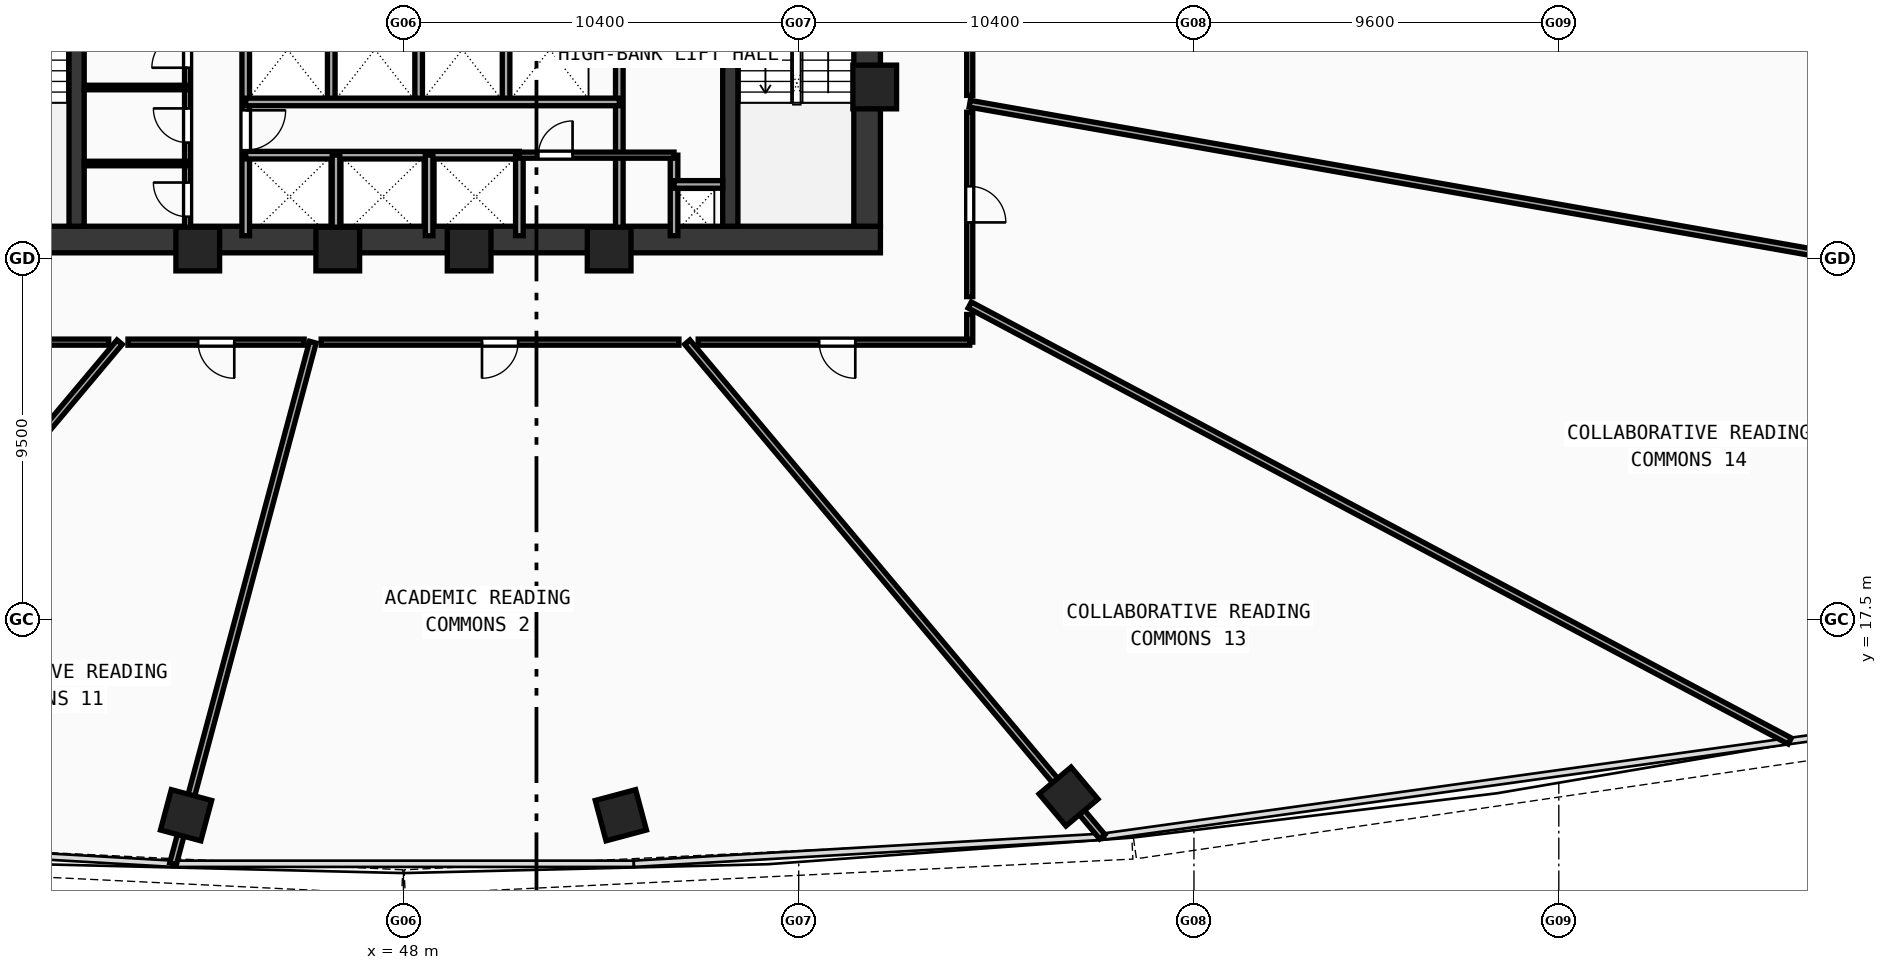
"""IFC4 building model, lengths in metres.
Left out: names, types, materials, properties, quantities, classifications, styles, units other than length and angle.
Written with IfcOpenShell. Run it as: python <this file> out.ifc"""

import sys

from ifc_helpers import new_model, si_unit, direction, frame, frame_2d, origin, origin_with_axes, origin_2d, place, context, subcontext, project, spatial, rectangle, hollow_rectangle, extrude, source, transform, mapped, element, fill, save


model = new_model("IFC4")
c1 = context("Model", 3, precision=1e-05, world=origin(), true_north=direction((0.0, 1.0)))
c2 = subcontext(c1, "Body", "Model", "MODEL_VIEW")
j1 = project(units=[si_unit("LENGTHUNIT", "METRE"), si_unit("PLANEANGLEUNIT", "RADIAN")], contexts=[c1])
p1 = place(None, origin())
s1 = spatial("IfcSite", under=j1, at=p1, CompositionType="ELEMENT")
p2 = place(p1, origin())
s2 = spatial("IfcBuilding", under=s1, at=p2, CompositionType="ELEMENT")
p3 = place(p2, frame((0.0, 0.0, 55.81)))
s3 = spatial("IfcBuildingStorey", under=s2, at=p3, CompositionType="ELEMENT", Elevation=55.81)
p4 = place(p3, frame((35.45, 27.5, 0.0), z_axis=(0.0, 0.0, 1.0), x_axis=(1.0, 0.0, 0.0)))
e1 = element("IfcWall", 1, at=p4, inside=s3, PredefinedType="SHEAR", context=c2, shape_type="SweptSolid", body=[
    extrude(rectangle(XDim=25.1, YDim=0.7, at=frame_2d((12.55, 0.0))), origin(), (0.0, 0.0, 1.0), 3.37),
])
p5 = place(p3, frame((60.2, 27.85, 0.0), z_axis=(0.0, 0.0, 1.0), x_axis=(0.0, 1.0, 0.0)))
e2 = element("IfcWall", 2, at=p5, inside=s3, PredefinedType="SHEAR", context=c2, shape_type="SweptSolid", body=[
    extrude(rectangle(XDim=12.0, YDim=0.7, at=frame_2d((6.0, 0.0))), origin(), (0.0, 0.0, 1.0), 3.37),
])
p6 = place(p3, frame((39.4, 27.85, 0.0), z_axis=(0.0, 0.0, 1.0), x_axis=(0.0, 1.0, 0.0)))
e3 = element("IfcWall", 3, at=p6, inside=s3, PredefinedType="SHEAR", context=c2, shape_type="SweptSolid", body=[
    extrude(rectangle(XDim=12.0, YDim=0.4, at=frame_2d((6.0, 0.0))), origin(), (0.0, 0.0, 1.0), 3.37),
])
p7 = place(p6, frame((9.9, 0.0, 0.0)))
e4 = element("IfcOpeningElement", 4, at=p7, cuts=e3, PredefinedType="OPENING", context=c2, shape_type="SweptSolid", body=[
    extrude(rectangle(XDim=1.1, YDim=2.1, at=frame_2d((0.55, 1.05))), frame((0.0, 0.21, 0.0), z_axis=(0.0, -1.0, 0.0), x_axis=(1.0, 0.0, 0.0)), (0.0, 0.0, 1.0), 0.42),
])
p8 = place(p3, frame((56.6, 27.85, 0.0), z_axis=(0.0, 0.0, 1.0), x_axis=(0.0, 1.0, 0.0)))
e5 = element("IfcWall", 5, at=p8, inside=s3, PredefinedType="SHEAR", context=c2, shape_type="SweptSolid", body=[
    extrude(rectangle(XDim=12.0, YDim=0.4, at=frame_2d((6.0, 0.0))), origin(), (0.0, 0.0, 1.0), 3.37),
])
p9 = place(p8, frame((9.9, 0.0, 0.0)))
e6 = element("IfcOpeningElement", 6, at=p9, cuts=e5, PredefinedType="OPENING", context=c2, shape_type="SweptSolid", body=[
    extrude(rectangle(XDim=1.1, YDim=2.1, at=frame_2d((0.55, 1.05))), frame((0.0, 0.21, 0.0), z_axis=(0.0, -1.0, 0.0), x_axis=(1.0, 0.0, 0.0)), (0.0, 0.0, 1.0), 0.42),
])
m1 = source(origin(), c2, "Body", "SweptSolid", [
    extrude(hollow_rectangle(XDim=1.15, YDim=1.15, WallThickness=0.048, at=origin_2d()), origin(), (0.0, 0.0, 1.0), 3.63),
])
for number, where, z_axis, x_axis in (
    (7, (42.588, 27.25, -0.26), (0.0, 0.0, 1.0), (1.0, 0.0, 0.0)),
    (8, (46.272, 27.25, -0.26), (0.0, 0.0, 1.0), (1.0, 0.0, 0.0)),
    (9, (49.729, 27.25, -0.26), (0.0, 0.0, 1.0), (1.0, 0.0, 0.0)),
    (10, (53.412, 27.25, -0.26), (0.0, 0.0, 1.0), (1.0, 0.0, 0.0)),
    (11, (60.4, 31.513, -0.26), (0.0, 0.0, 1.0), (1.0, 0.0, 0.0)),
):
    element("IfcColumn", number, at=place(p3, frame(where, z_axis=z_axis, x_axis=x_axis)), inside=s3, PredefinedType="COLUMN", context=c2, shape_type="MappedRepresentation", body=[
        mapped(m1, transform((0.0, 0.0, 0.0), scale=1.0)),
    ])
m2 = source(origin(), c2, "Body", "SweptSolid", [
    extrude(hollow_rectangle(XDim=1.1, YDim=1.1, WallThickness=0.045, at=origin_2d()), origin(), (0.0, 0.0, 1.0), 3.63),
])
for number, where, z_axis, x_axis in (
    (12, (42.28, 12.352, -0.26), (0.0, 0.0, 1.0), (0.966, -0.259, 0.0)),
    (13, (53.72, 12.352, -0.26), (0.0, 0.0, 1.0), (0.966, 0.259, 0.0)),
    (14, (65.5, 12.844, -0.26), (0.0, 0.0, 1.0), (0.766, 0.643, 0.0)),
):
    element("IfcColumn", number, at=place(p3, frame(where, z_axis=z_axis, x_axis=x_axis)), inside=s3, PredefinedType="COLUMN", context=c2, shape_type="MappedRepresentation", body=[
        mapped(m2, transform((0.0, 0.0, 0.0), scale=1.0)),
    ])
p10 = place(p3, frame((43.85, 27.6, 0.0), z_axis=(0.0, 0.0, 1.0), x_axis=(0.0, 1.0, 0.0)))
e15 = element("IfcWall", 15, at=p10, inside=s3, PredefinedType="SOLIDWALL", context=c2, shape_type="SweptSolid", body=[
    extrude(rectangle(XDim=6.22, YDim=0.2, at=frame_2d((3.11, 0.0))), origin(), (0.0, 0.0, 1.0), 3.37),
])
p11 = place(p10, frame((2.25, 0.0, 0.0)))
e16 = element("IfcOpeningElement", 16, at=p11, cuts=e15, PredefinedType="OPENING", context=c2, shape_type="SweptSolid", body=[
    extrude(rectangle(XDim=1.05, YDim=2.1, at=frame_2d((0.525, 1.05))), frame((0.0, 0.11, 0.0), z_axis=(0.0, -1.0, 0.0), x_axis=(1.0, 0.0, 0.0)), (0.0, 0.0, 1.0), 0.22),
])
p12 = place(p3, frame((53.68, 27.6, 0.0), z_axis=(0.0, 0.0, 1.0), x_axis=(0.0, 1.0, 0.0)))
e17 = element("IfcWall", 17, at=p12, inside=s3, PredefinedType="SOLIDWALL", context=c2, shape_type="SweptSolid", body=[
    extrude(rectangle(XDim=9.05, YDim=0.2, at=frame_2d((4.525, 0.0))), origin(), (0.0, 0.0, 1.0), 3.37),
])
p13 = place(p12, frame((6.9, 0.0, 0.0)))
e18 = element("IfcOpeningElement", 18, at=p13, cuts=e17, PredefinedType="OPENING", context=c2, shape_type="SweptSolid", body=[
    extrude(rectangle(XDim=1.05, YDim=2.1, at=frame_2d((0.525, 1.05))), frame((0.0, 0.11, 0.0), z_axis=(0.0, -1.0, 0.0), x_axis=(1.0, 0.0, 0.0)), (0.0, 0.0, 1.0), 0.22),
])
for number, where, z_axis, x_axis in (
    (19, (46.1, 31.12, 0.0), (0.0, 0.0, 1.0), (0.0, 1.0, 0.0)),
    (20, (48.4, 31.12, 0.0), (0.0, 0.0, 1.0), (0.0, 1.0, 0.0)),
    (21, (50.7, 31.12, 0.0), (0.0, 0.0, 1.0), (0.0, 1.0, 0.0)),
):
    element("IfcWall", number, at=place(p3, frame(where, z_axis=z_axis, x_axis=x_axis)), inside=s3, PredefinedType="SOLIDWALL", context=c2, shape_type="SweptSolid", body=[
        extrude(rectangle(XDim=2.7, YDim=0.2, at=frame_2d((1.35, 0.0))), origin(), (0.0, 0.0, 1.0), 3.37),
    ])
p14 = place(p3, frame((43.85, 29.72, 0.0), z_axis=(0.0, 0.0, 1.0), x_axis=(1.0, 0.0, 0.0)))
e22 = element("IfcWall", 22, at=p14, inside=s3, PredefinedType="SOLIDWALL", context=c2, shape_type="SweptSolid", body=[
    extrude(rectangle(XDim=7.2, YDim=0.2, at=frame_2d((3.6, 0.0))), origin(), (0.0, 0.0, 1.0), 3.37),
])
p15 = place(p3, frame((51.05, 27.6, 0.0), z_axis=(0.0, 0.0, 1.0), x_axis=(0.0, 1.0, 0.0)))
e23 = element("IfcWall", 23, at=p15, inside=s3, PredefinedType="SOLIDWALL", context=c2, shape_type="SweptSolid", body=[
    extrude(rectangle(XDim=2.12, YDim=0.2, at=frame_2d((1.06, 0.0))), origin(), (0.0, 0.0, 1.0), 3.37),
])
p16 = place(p3, frame((43.85, 31.12, 0.0), z_axis=(0.0, 0.0, 1.0), x_axis=(1.0, 0.0, 0.0)))
e24 = element("IfcWall", 24, at=p16, inside=s3, PredefinedType="SOLIDWALL", context=c2, shape_type="SweptSolid", body=[
    extrude(rectangle(XDim=9.83, YDim=0.2, at=frame_2d((4.915, 0.0))), origin(), (0.0, 0.0, 1.0), 3.37),
])
for number, where, z_axis, x_axis in (
    (25, (46.225, 27.6, 0.0), (0.0, 0.0, 1.0), (0.0, 1.0, 0.0)),
    (26, (48.675, 27.6, 0.0), (0.0, 0.0, 1.0), (0.0, 1.0, 0.0)),
    (27, (55.12, 27.6, 0.0), (0.0, 0.0, 1.0), (0.0, 1.0, 0.0)),
):
    element("IfcWall", number, at=place(p3, frame(where, z_axis=z_axis, x_axis=x_axis)), inside=s3, PredefinedType="SOLIDWALL", context=c2, shape_type="SweptSolid", body=[
        extrude(rectangle(XDim=2.12, YDim=0.2, at=frame_2d((1.06, 0.0))), origin(), (0.0, 0.0, 1.0), 3.37),
    ])
p17 = place(p3, frame((55.12, 28.95, 0.0), z_axis=(0.0, 0.0, 1.0), x_axis=(1.0, 0.0, 0.0)))
e28 = element("IfcWall", 28, at=p17, inside=s3, PredefinedType="SOLIDWALL", context=c2, shape_type="SweptSolid", body=[
    extrude(rectangle(XDim=1.28, YDim=0.2, at=frame_2d((0.64, 0.0))), origin(), (0.0, 0.0, 1.0), 3.37),
])
p18 = place(p3, frame((42.32, 27.6, 0.0), z_axis=(0.0, 0.0, 1.0), x_axis=(0.0, 1.0, 0.0)))
e29 = element("IfcWall", 29, at=p18, inside=s3, PredefinedType="PARTITIONING", context=c2, shape_type="SweptSolid", body=[
    extrude(rectangle(XDim=5.9, YDim=0.16, at=frame_2d((2.95, 0.0))), origin(), (0.0, 0.0, 1.0), 3.37),
])
p19 = place(p18, frame((0.5, 0.0, 0.0)))
e30 = element("IfcOpeningElement", 30, at=p19, cuts=e29, PredefinedType="OPENING", context=c2, shape_type="SweptSolid", body=[
    extrude(rectangle(XDim=0.9, YDim=2.1, at=frame_2d((0.45, 1.05))), frame((0.0, 0.09, 0.0), z_axis=(0.0, -1.0, 0.0), x_axis=(1.0, 0.0, 0.0)), (0.0, 0.0, 1.0), 0.18),
])
p20 = place(p18, frame((2.45, 0.0, 0.0)))
e31 = element("IfcOpeningElement", 31, at=p20, cuts=e29, PredefinedType="OPENING", context=c2, shape_type="SweptSolid", body=[
    extrude(rectangle(XDim=0.9, YDim=2.1, at=frame_2d((0.45, 1.05))), frame((0.0, 0.09, 0.0), z_axis=(0.0, -1.0, 0.0), x_axis=(1.0, 0.0, 0.0)), (0.0, 0.0, 1.0), 0.18),
])
p21 = place(p18, frame((4.42, 0.0, 0.0)))
e32 = element("IfcOpeningElement", 32, at=p21, cuts=e29, PredefinedType="OPENING", context=c2, shape_type="SweptSolid", body=[
    extrude(rectangle(XDim=0.94, YDim=2.1, at=frame_2d((0.47, 1.05))), frame((0.0, 0.09, 0.0), z_axis=(0.0, -1.0, 0.0), x_axis=(1.0, 0.0, 0.0)), (0.0, 0.0, 1.0), 0.18),
])
p22 = place(p3, frame((51.05, 29.72, 0.0), z_axis=(0.0, 0.0, 1.0), x_axis=(1.0, 0.0, 0.0)))
e33 = element("IfcWall", 33, at=p22, inside=s3, PredefinedType="PARTITIONING", context=c2, shape_type="SweptSolid", body=[
    extrude(rectangle(XDim=4.07, YDim=0.16, at=frame_2d((2.035, 0.0))), origin(), (0.0, 0.0, 1.0), 3.37),
])
p23 = place(p22, frame((0.5, 0.0, 0.0)))
e34 = element("IfcOpeningElement", 34, at=p23, cuts=e33, PredefinedType="OPENING", context=c2, shape_type="SweptSolid", body=[
    extrude(rectangle(XDim=0.9, YDim=2.1, at=frame_2d((0.45, 1.05))), frame((0.0, 0.09, 0.0), z_axis=(0.0, -1.0, 0.0), x_axis=(1.0, 0.0, 0.0)), (0.0, 0.0, 1.0), 0.18),
])
for number, where, z_axis, x_axis in (
    (35, (39.6, 29.5, 0.0), (0.0, 0.0, 1.0), (1.0, 0.0, 0.0)),
    (36, (39.6, 31.5, 0.0), (0.0, 0.0, 1.0), (1.0, 0.0, 0.0)),
):
    element("IfcWall", number, at=place(p3, frame(where, z_axis=z_axis, x_axis=x_axis)), inside=s3, PredefinedType="PARTITIONING", context=c2, shape_type="SweptSolid", body=[
        extrude(rectangle(XDim=2.72, YDim=0.12, at=frame_2d((1.36, 0.0))), origin(), (0.0, 0.0, 1.0), 3.37),
    ])
p24 = place(p3, frame((40.532, 24.8, 0.0), z_axis=(0.0, 0.0, 1.0), x_axis=(-0.642791593325, -0.766041100432, 0.0)))
e37 = element("IfcWall", 37, at=p24, inside=s3, PredefinedType="PARTITIONING", context=c2, shape_type="SweptSolid", body=[
    extrude(rectangle(XDim=16.988, YDim=0.18, at=frame_2d((8.494, 0.0))), origin(), (0.0, 0.0, 1.0), 2.67),
])
p25 = place(p3, frame((45.615, 24.8, 0.0), z_axis=(0.0, 0.0, 1.0), x_axis=(-0.258821679731, -0.965925120339, 0.0)))
e38 = element("IfcWall", 38, at=p25, inside=s3, PredefinedType="PARTITIONING", context=c2, shape_type="SweptSolid", body=[
    extrude(rectangle(XDim=14.209, YDim=0.18, at=frame_2d((7.105, 0.0))), origin(), (0.0, 0.0, 1.0), 2.67),
])
p26 = place(p3, frame((55.468, 24.8, 0.0), z_axis=(0.0, 0.0, 1.0), x_axis=(0.642791593325, -0.766041100432, 0.0)))
e39 = element("IfcWall", 39, at=p26, inside=s3, PredefinedType="PARTITIONING", context=c2, shape_type="SweptSolid", body=[
    extrude(rectangle(XDim=16.988, YDim=0.18, at=frame_2d((8.494, 0.0))), origin(), (0.0, 0.0, 1.0), 2.67),
])
p27 = place(p3, frame((62.9, 25.778, 0.0), z_axis=(0.0, 0.0, 1.0), x_axis=(0.882949316257, -0.469468321531, 0.0)))
e40 = element("IfcWall", 40, at=p27, inside=s3, PredefinedType="PARTITIONING", context=c2, shape_type="SweptSolid", body=[
    extrude(rectangle(XDim=24.437, YDim=0.18, at=frame_2d((12.219, 0.0))), origin(), (0.0, 0.0, 1.0), 2.67),
])
p28 = place(p3, frame((62.9, 31.073, 0.0), z_axis=(0.0, 0.0, 1.0), x_axis=(0.984808099647, -0.173646211791, 0.0)))
e41 = element("IfcWall", 41, at=p28, inside=s3, PredefinedType="PARTITIONING", context=c2, shape_type="SweptSolid", body=[
    extrude(rectangle(XDim=26.93, YDim=0.18, at=frame_2d((13.465, 0.0))), origin(), (0.0, 0.0, 1.0), 2.67),
])
p29 = place(p3, frame((62.9, 38.322, 0.0), z_axis=(0.0, 0.0, 1.0), x_axis=(0.0, -1.0, 0.0)))
e42 = element("IfcWall", 42, at=p29, inside=s3, PredefinedType="PARTITIONING", context=c2, shape_type="SweptSolid", body=[
    extrude(rectangle(XDim=7.029, YDim=0.16, at=frame_2d((3.515, 0.0))), origin(), (0.0, 0.0, 1.0), 3.37),
])
p30 = place(p29, frame((3.054, 0.0, 0.0)))
e43 = element("IfcOpeningElement", 43, at=p30, cuts=e42, PredefinedType="OPENING", context=c2, shape_type="SweptSolid", body=[
    extrude(rectangle(XDim=0.92, YDim=2.1, at=frame_2d((0.46, 1.05))), frame((0.0, 0.09, 0.0), z_axis=(0.0, -1.0, 0.0), x_axis=(1.0, 0.0, 0.0)), (0.0, 0.0, 1.0), 0.18),
])
p31 = place(p3, frame((62.9, 30.849, 0.0), z_axis=(0.0, 0.0, 1.0), x_axis=(0.0, -1.0, 0.0)))
e44 = element("IfcWall", 44, at=p31, inside=s3, PredefinedType="PARTITIONING", context=c2, shape_type="SweptSolid", body=[
    extrude(rectangle(XDim=4.852, YDim=0.16, at=frame_2d((2.426, 0.0))), origin(), (0.0, 0.0, 1.0), 3.37),
])
p32 = place(p31, frame((1.949, 0.0, 0.0)))
e45 = element("IfcOpeningElement", 45, at=p32, cuts=e44, PredefinedType="OPENING", context=c2, shape_type="SweptSolid", body=[
    extrude(rectangle(XDim=0.95, YDim=2.1, at=frame_2d((0.475, 1.05))), frame((0.0, 0.09, 0.0), z_axis=(0.0, -1.0, 0.0), x_axis=(1.0, 0.0, 0.0)), (0.0, 0.0, 1.0), 0.18),
])
p33 = place(p3, frame((62.9, 25.528, 0.0), z_axis=(0.0, 0.0, 1.0), x_axis=(0.0, -1.0, 0.0)))
e46 = element("IfcWall", 46, at=p33, inside=s3, PredefinedType="PARTITIONING", context=c2, shape_type="SweptSolid", body=[
    extrude(rectangle(XDim=0.728, YDim=0.16, at=frame_2d((0.364, 0.0))), origin(), (0.0, 0.0, 1.0), 2.97),
])
p34 = place(p3, frame((62.9, 24.8, 0.0), z_axis=(0.0, 0.0, 1.0), x_axis=(-1.0, 0.0, 0.0)))
e47 = element("IfcWall", 47, at=p34, inside=s3, PredefinedType="PARTITIONING", context=c2, shape_type="SweptSolid", body=[
    extrude(rectangle(XDim=7.145, YDim=0.16, at=frame_2d((3.572, 0.0))), origin(), (0.0, 0.0, 1.0), 2.97),
])
p35 = place(p34, frame((3.011, 0.0, 0.0)))
e48 = element("IfcOpeningElement", 48, at=p35, cuts=e47, PredefinedType="OPENING", context=c2, shape_type="SweptSolid", body=[
    extrude(rectangle(XDim=0.95, YDim=2.1, at=frame_2d((0.475, 1.05))), frame((0.0, 0.09, 0.0), z_axis=(0.0, -1.0, 0.0), x_axis=(1.0, 0.0, 0.0)), (0.0, 0.0, 1.0), 0.18),
])
p36 = place(p3, frame((55.248, 24.8, 0.0), z_axis=(0.0, 0.0, 1.0), x_axis=(-1.0, 0.0, 0.0)))
e49 = element("IfcWall", 49, at=p36, inside=s3, PredefinedType="PARTITIONING", context=c2, shape_type="SweptSolid", body=[
    extrude(rectangle(XDim=9.413, YDim=0.16, at=frame_2d((4.707, 0.0))), origin(), (0.0, 0.0, 1.0), 2.67),
])
p37 = place(p36, frame((4.231, 0.0, 0.0)))
e50 = element("IfcOpeningElement", 50, at=p37, cuts=e49, PredefinedType="OPENING", context=c2, shape_type="SweptSolid", body=[
    extrude(rectangle(XDim=0.95, YDim=2.1, at=frame_2d((0.475, 1.05))), frame((0.0, 0.09, 0.0), z_axis=(0.0, -1.0, 0.0), x_axis=(1.0, 0.0, 0.0)), (0.0, 0.0, 1.0), 0.18),
])
p38 = place(p3, frame((45.387, 24.8, 0.0), z_axis=(0.0, 0.0, 1.0), x_axis=(-1.0, 0.0, 0.0)))
e51 = element("IfcWall", 51, at=p38, inside=s3, PredefinedType="PARTITIONING", context=c2, shape_type="SweptSolid", body=[
    extrude(rectangle(XDim=4.635, YDim=0.16, at=frame_2d((2.318, 0.0))), origin(), (0.0, 0.0, 1.0), 2.67),
])
p39 = place(p38, frame((1.839, 0.0, 0.0)))
e52 = element("IfcOpeningElement", 52, at=p39, cuts=e51, PredefinedType="OPENING", context=c2, shape_type="SweptSolid", body=[
    extrude(rectangle(XDim=0.95, YDim=2.1, at=frame_2d((0.475, 1.05))), frame((0.0, 0.09, 0.0), z_axis=(0.0, -1.0, 0.0), x_axis=(1.0, 0.0, 0.0)), (0.0, 0.0, 1.0), 0.18),
])
p40 = place(p3, frame((40.245, 24.8, 0.0), z_axis=(0.0, 0.0, 1.0), x_axis=(-1.0, 0.0, 0.0)))
e53 = element("IfcWall", 53, at=p40, inside=s3, PredefinedType="PARTITIONING", context=c2, shape_type="SweptSolid", body=[
    extrude(rectangle(XDim=8.445, YDim=0.16, at=frame_2d((4.222, 0.0))), origin(), (0.0, 0.0, 1.0), 2.97),
])
p41 = place(p40, frame((3.654, 0.0, 0.0)))
e54 = element("IfcOpeningElement", 54, at=p41, cuts=e53, PredefinedType="OPENING", context=c2, shape_type="SweptSolid", body=[
    extrude(rectangle(XDim=0.95, YDim=2.1, at=frame_2d((0.475, 1.05))), frame((0.0, 0.09, 0.0), z_axis=(0.0, -1.0, 0.0), x_axis=(1.0, 0.0, 0.0)), (0.0, 0.0, 1.0), 0.18),
])
m3 = source(origin(), c2, "Body", "SweptSolid", [
    extrude(rectangle(XDim=1.05, YDim=2.1, at=frame_2d((0.525, 1.05))), frame((0.0, 0.025, 0.0), z_axis=(0.0, -1.0, 0.0), x_axis=(1.0, 0.0, 0.0)), (0.0, 0.0, 1.0), 0.05),
])
p42 = place(p11, frame((1.05, 0.0, 0.0), z_axis=(0.0, 0.0, 1.0), x_axis=(-1.0, 0.0, 0.0)))
e55 = element("IfcDoor", 55, at=p42, inside=s3, OperationType="SINGLE_SWING_LEFT", PredefinedType="DOOR", context=c2, shape_type="MappedRepresentation", body=[
    mapped(m3, transform((0.0, 0.0, 0.0), scale=1.0)),
])
fill(e16, e55)
m4 = source(origin(), c2, "Body", "SweptSolid", [
    extrude(rectangle(XDim=0.9, YDim=2.1, at=frame_2d((0.45, 1.05))), frame((0.0, 0.025, 0.0), z_axis=(0.0, -1.0, 0.0), x_axis=(1.0, 0.0, 0.0)), (0.0, 0.0, 1.0), 0.05),
])
p43 = place(p19, origin_with_axes())
e56 = element("IfcDoor", 56, at=p43, inside=s3, OperationType="SINGLE_SWING_RIGHT", PredefinedType="DOOR", context=c2, shape_type="MappedRepresentation", body=[
    mapped(m4, transform((0.0, 0.0, 0.0), scale=1.0)),
])
fill(e30, e56)
p44 = place(p20, origin_with_axes())
e57 = element("IfcDoor", 57, at=p44, inside=s3, OperationType="SINGLE_SWING_RIGHT", PredefinedType="DOOR", context=c2, shape_type="MappedRepresentation", body=[
    mapped(m4, transform((0.0, 0.0, 0.0), scale=1.0)),
])
fill(e31, e57)
m5 = source(origin(), c2, "Body", "SweptSolid", [
    extrude(rectangle(XDim=0.94, YDim=2.1, at=frame_2d((0.47, 1.05))), frame((0.0, 0.025, 0.0), z_axis=(0.0, -1.0, 0.0), x_axis=(1.0, 0.0, 0.0)), (0.0, 0.0, 1.0), 0.05),
])
p45 = place(p21, origin_with_axes())
e58 = element("IfcDoor", 58, at=p45, inside=s3, OperationType="SINGLE_SWING_LEFT", PredefinedType="DOOR", context=c2, shape_type="MappedRepresentation", body=[
    mapped(m5, transform((0.0, 0.0, 0.0), scale=1.0)),
])
fill(e32, e58)
p46 = place(p23, origin_with_axes())
e59 = element("IfcDoor", 59, at=p46, inside=s3, OperationType="SINGLE_SWING_RIGHT", PredefinedType="DOOR", context=c2, shape_type="MappedRepresentation", body=[
    mapped(m4, transform((0.0, 0.0, 0.0), scale=1.0)),
])
fill(e34, e59)
m6 = source(origin(), c2, "Body", "SweptSolid", [
    extrude(rectangle(XDim=0.95, YDim=2.1, at=frame_2d((0.475, 1.05))), frame((0.0, 0.025, 0.0), z_axis=(0.0, -1.0, 0.0), x_axis=(1.0, 0.0, 0.0)), (0.0, 0.0, 1.0), 0.05),
])
p47 = place(p39, origin_with_axes())
e60 = element("IfcDoor", 60, at=p47, inside=s3, OperationType="SINGLE_SWING_LEFT", PredefinedType="DOOR", context=c2, shape_type="MappedRepresentation", body=[
    mapped(m6, transform((0.0, 0.0, 0.0), scale=1.0)),
])
fill(e52, e60)
p48 = place(p37, origin_with_axes())
e61 = element("IfcDoor", 61, at=p48, inside=s3, OperationType="SINGLE_SWING_RIGHT", PredefinedType="DOOR", context=c2, shape_type="MappedRepresentation", body=[
    mapped(m6, transform((0.0, 0.0, 0.0), scale=1.0)),
])
fill(e50, e61)
p49 = place(p35, origin_with_axes())
e62 = element("IfcDoor", 62, at=p49, inside=s3, OperationType="SINGLE_SWING_LEFT", PredefinedType="DOOR", context=c2, shape_type="MappedRepresentation", body=[
    mapped(m6, transform((0.0, 0.0, 0.0), scale=1.0)),
])
fill(e48, e62)
p50 = place(p32, origin_with_axes())
e63 = element("IfcDoor", 63, at=p50, inside=s3, OperationType="SINGLE_SWING_RIGHT", PredefinedType="DOOR", context=c2, shape_type="MappedRepresentation", body=[
    mapped(m6, transform((0.0, 0.0, 0.0), scale=1.0)),
])
fill(e45, e63)
save(model, sys.argv[1])
